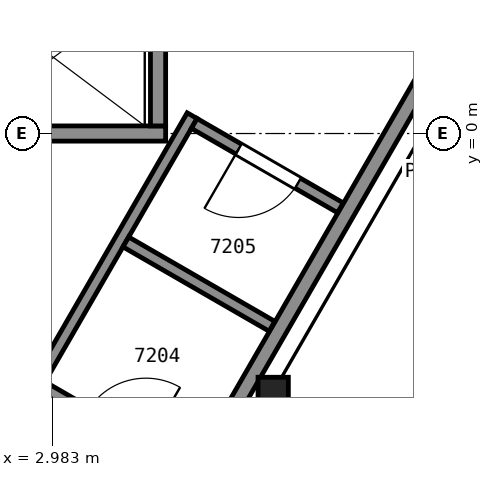
"""IFC4 building model, lengths in metres.
Left out: names, types, materials, properties, quantities, classifications, styles, units other than length and angle.
Written with IfcOpenShell. Run it as: python <this file> out.ifc"""

import sys

from ifc_helpers import new_model, si_unit, direction, frame, frame_2d, origin, origin_2d, place, context, subcontext, project, spatial, rectangle, i_section, extrude, element, fill, save


model = new_model("IFC4")
c1 = context("Model", 3, precision=1e-05, world=origin(), true_north=direction((0.0, 1.0)))
c2 = subcontext(c1, "Body", "Model", "MODEL_VIEW")
j1 = project(units=[si_unit("LENGTHUNIT", "METRE"), si_unit("PLANEANGLEUNIT", "RADIAN")], contexts=[c1])
p1 = place(None, origin())
s1 = spatial("IfcSite", under=j1, at=p1, CompositionType="ELEMENT")
p2 = place(p1, origin())
s2 = spatial("IfcBuilding", under=s1, at=p2, CompositionType="ELEMENT")
p3 = place(p2, frame((0.0, 0.0, 286.2)))
s3 = spatial("IfcBuildingStorey", under=s2, at=p3, CompositionType="ELEMENT", Elevation=286.2)
p4 = place(p3, frame((5.89, -3.4, 0.0), z_axis=(0.0, 0.0, 1.0), x_axis=(1.0, 0.0, 0.0)))
e1 = element("IfcColumn", 1, at=p4, inside=s3, PredefinedType="COLUMN", context=c2, shape_type="SweptSolid", body=[
    extrude(i_section(OverallWidth=0.399, OverallDepth=0.386, WebThickness=0.021, FlangeThickness=0.033, FilletRadius=0.015, at=origin_2d()), origin(), (0.0, 0.0, 1.0), 3.7),
])
p5 = place(p3, frame((1.525, 0.0, 0.0), z_axis=(0.0, 0.0, 1.0), x_axis=(1.0, 0.0, 0.0)))
e2 = element("IfcWall", 2, at=p5, inside=s3, PredefinedType="PARTITIONING", context=c2, shape_type="SweptSolid", body=[
    extrude(rectangle(XDim=2.95, YDim=0.2, at=frame_2d((1.475, 0.0))), origin(), (0.0, 0.0, 1.0), 3.7),
])
p6 = place(p3, frame((4.375, 0.1, 0.0), z_axis=(0.0, 0.0, 1.0), x_axis=(0.0, 1.0, 0.0)))
e3 = element("IfcWall", 3, at=p6, inside=s3, PredefinedType="PARTITIONING", context=c2, shape_type="SweptSolid", body=[
    extrude(rectangle(XDim=1.95, YDim=0.2, at=frame_2d((0.975, 0.0))), origin(), (0.0, 0.0, 1.0), 3.7),
])
p7 = place(p3, frame((2.749, -3.359, 0.0), z_axis=(0.0, 0.0, 1.0), x_axis=(0.500017827812, 0.866015110648, 0.0)))
e4 = element("IfcWall", 4, at=p7, inside=s3, PredefinedType="PARTITIONING", context=c2, shape_type="SweptSolid", body=[
    extrude(rectangle(XDim=4.15, YDim=0.15, at=frame_2d((2.075, 0.0))), origin(), (0.0, 0.0, 1.0), 3.45),
])
p8 = place(p3, frame((2.851, -3.332, 0.0), z_axis=(0.0, 0.0, 1.0), x_axis=(0.866110524189, -0.499852538144, 0.0)))
e5 = element("IfcWall", 5, at=p8, inside=s3, PredefinedType="PARTITIONING", context=c2, shape_type="SweptSolid", body=[
    extrude(rectangle(XDim=2.22, YDim=0.15, at=frame_2d((1.11, 0.0))), origin(), (0.0, 0.0, 1.0), 3.45),
])
p9 = place(p8, frame((0.675, 0.0, 0.0)))
e6 = element("IfcOpeningElement", 6, at=p9, cuts=e5, PredefinedType="OPENING", context=c2, shape_type="SweptSolid", body=[
    extrude(rectangle(XDim=0.9, YDim=2.1, at=frame_2d((0.45, 1.05))), frame((0.0, 0.085, 0.0), z_axis=(0.0, -1.0, 0.0), x_axis=(1.0, 0.0, 0.0)), (0.0, 0.0, 1.0), 0.17),
])
p10 = place(p3, frame((3.828, -6.29, 0.0), z_axis=(0.0, 0.0, 1.0), x_axis=(0.499979739078, 0.866037101117, 0.0)))
e7 = element("IfcWall", 7, at=p10, inside=s3, PredefinedType="PARTITIONING", context=c2, shape_type="SweptSolid", body=[
    extrude(rectangle(XDim=11.363, YDim=0.2, at=frame_2d((5.681, 0.0))), origin(), (0.0, 0.0, 1.0), 3.45),
])
p11 = place(p10, frame((0.55, 0.0, 0.0)))
e8 = element("IfcOpeningElement", 8, at=p11, cuts=e7, PredefinedType="OPENING", context=c2, shape_type="SweptSolid", body=[
    extrude(rectangle(XDim=1.2, YDim=2.1, at=frame_2d((0.6, 1.05))), frame((0.0, 0.11, 0.0), z_axis=(0.0, -1.0, 0.0), x_axis=(1.0, 0.0, 0.0)), (0.0, 0.0, 1.0), 0.22),
])
p12 = place(p3, frame((3.951, -1.427, 0.0), z_axis=(0.0, 0.0, 1.0), x_axis=(0.866062920605, -0.499935013329, 0.0)))
e9 = element("IfcWall", 9, at=p12, inside=s3, PredefinedType="PARTITIONING", context=c2, shape_type="SweptSolid", body=[
    extrude(rectangle(XDim=2.22, YDim=0.15, at=frame_2d((1.11, 0.0))), origin(), (0.0, 0.0, 1.0), 3.45),
])
p13 = place(p3, frame((6.774, -0.978, 0.0), z_axis=(0.0, 0.0, 1.0), x_axis=(-0.866062920605, 0.499935013329, 0.0)))
e10 = element("IfcWall", 10, at=p13, inside=s3, PredefinedType="PARTITIONING", context=c2, shape_type="SweptSolid", body=[
    extrude(rectangle(XDim=2.22, YDim=0.15, at=frame_2d((1.11, 0.0))), origin(), (0.0, 0.0, 1.0), 3.45),
])
p14 = place(p13, frame((0.646, 0.0, 0.0)))
e11 = element("IfcOpeningElement", 11, at=p14, cuts=e10, PredefinedType="OPENING", context=c2, shape_type="SweptSolid", body=[
    extrude(rectangle(XDim=0.9, YDim=2.1, at=frame_2d((0.45, 1.05))), frame((0.0, 0.085, 0.0), z_axis=(0.0, -1.0, 0.0), x_axis=(1.0, 0.0, 0.0)), (0.0, 0.0, 1.0), 0.17),
])
p15 = place(p14, origin())
e12 = element("IfcDoor", 12, at=p15, inside=s3, OperationType="SINGLE_SWING_RIGHT", PredefinedType="DOOR", context=c2, shape_type="SweptSolid", body=[
    extrude(rectangle(XDim=0.9, YDim=2.1, at=frame_2d((0.45, 1.05))), frame((0.0, 0.025, 0.0), z_axis=(0.0, -1.0, 0.0), x_axis=(1.0, 0.0, 0.0)), (0.0, 0.0, 1.0), 0.05),
])
fill(e11, e12)
save(model, sys.argv[1])
